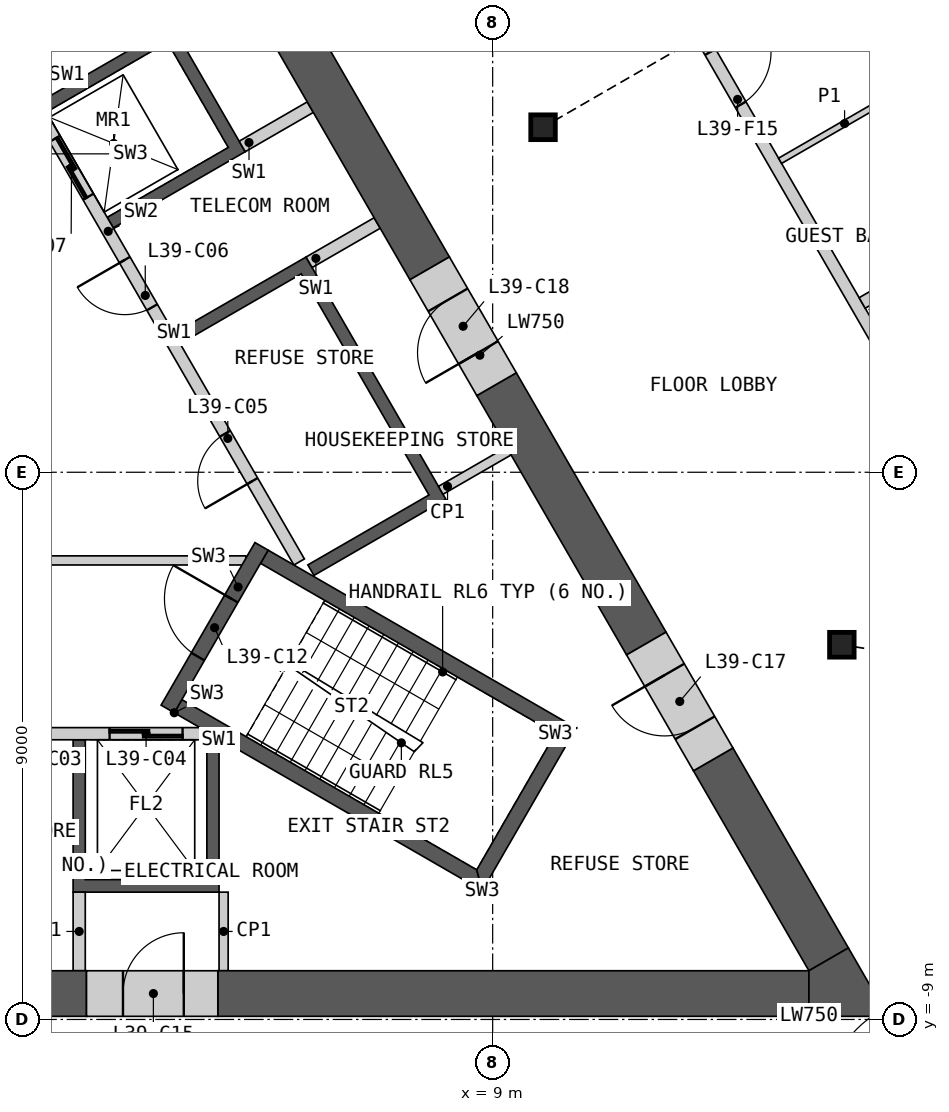
"""IFC4 building model, lengths in metres.
Left out: names, types, materials, properties, quantities, classifications, styles, units other than length and angle.
Written with IfcOpenShell. Run it as: python <this file> out.ifc"""

import sys

from ifc_helpers import new_model, si_unit, direction, frame, frame_2d, origin, origin_2d, place, context, subcontext, project, spatial, polyline, rectangle, i_section, outline, extrude, element, fill, save


model = new_model("IFC4")
c1 = context("Model", 3, precision=1e-05, world=origin(), true_north=direction((0.0, 1.0)))
c2 = subcontext(c1, "Body", "Model", "MODEL_VIEW")
j1 = project(units=[si_unit("LENGTHUNIT", "METRE"), si_unit("PLANEANGLEUNIT", "RADIAN")], contexts=[c1])
p1 = place(None, origin())
s1 = spatial("IfcSite", under=j1, at=p1, CompositionType="ELEMENT")
p2 = place(p1, origin())
s2 = spatial("IfcBuilding", under=s1, at=p2, CompositionType="ELEMENT")
p3 = place(p2, frame((0.0, 0.0, 183.6)))
s3 = spatial("IfcBuildingStorey", under=s2, at=p3, CompositionType="ELEMENT", Elevation=183.6)
for number, where, z_axis, x_axis in (
    (1, (14.743, -2.837, 0.0), (0.0, 0.0, 1.0), (1.0, 0.0, 0.0)),
    (2, (9.828, 5.675, 0.0), (0.0, 0.0, 1.0), (1.0, 0.0, 0.0)),
):
    element("IfcColumn", number, at=place(p3, frame(where, z_axis=z_axis, x_axis=x_axis)), inside=s3, PredefinedType="COLUMN", context=c2, shape_type="SweptSolid", body=[
        extrude(i_section(OverallWidth=0.404, OverallDepth=0.407, WebThickness=0.027, FlangeThickness=0.044, at=origin_2d()), origin(), (0.0, 0.0, 1.0), 3.6),
    ])
p4 = place(p3, origin())
e3 = element("IfcWall", 3, at=p4, inside=s3, PredefinedType="SHEAR", context=c2, shape_type="SweptSolid", body=[
    extrude(outline(polyline([(4.5, -4.4), (4.5, -6.906), (2.1, -6.906), (2.1, -4.4), (2.3, -4.4), (2.3, -6.7), (4.3, -6.7), (4.3, -4.4), (4.5, -4.4)])), origin(), (0.0, 0.0, 1.0), 3.25),
])
p5 = place(p3, frame((-4.187, -4.3, 0.0), z_axis=(0.0, 0.0, 1.0), x_axis=(1.0, 0.0, 0.0)))
e4 = element("IfcWall", 4, at=p5, inside=s3, PredefinedType="SOLIDWALL", context=c2, shape_type="SweptSolid", body=[
    extrude(rectangle(XDim=8.373, YDim=0.2, at=frame_2d((4.187, 0.0))), origin(), (0.0, 0.0, 1.0), 3.25),
])
p6 = place(p5, frame((0.287, 0.0, 0.0)))
e5 = element("IfcOpeningElement", 5, at=p6, cuts=e4, PredefinedType="OPENING", context=c2, shape_type="SweptSolid", body=[
    extrude(rectangle(XDim=1.2, YDim=2.1, at=frame_2d((0.6, 1.05))), frame((0.0, 0.11, 0.0), z_axis=(0.0, -1.0, 0.0), x_axis=(1.0, 0.0, 0.0)), (0.0, 0.0, 1.0), 0.22),
])
p7 = place(p5, frame((2.387, 0.0, 0.0)))
e6 = element("IfcOpeningElement", 6, at=p7, cuts=e4, PredefinedType="OPENING", context=c2, shape_type="SweptSolid", body=[
    extrude(rectangle(XDim=1.4, YDim=2.1, at=frame_2d((0.7, 1.05))), frame((0.0, 0.11, 0.0), z_axis=(0.0, -1.0, 0.0), x_axis=(1.0, 0.0, 0.0)), (0.0, 0.0, 1.0), 0.22),
])
p8 = place(p5, frame((4.837, 0.0, 0.0)))
e7 = element("IfcOpeningElement", 7, at=p8, cuts=e4, PredefinedType="OPENING", context=c2, shape_type="SweptSolid", body=[
    extrude(rectangle(XDim=0.9, YDim=2.1, at=frame_2d((0.45, 1.05))), frame((0.0, 0.11, 0.0), z_axis=(0.0, -1.0, 0.0), x_axis=(1.0, 0.0, 0.0)), (0.0, 0.0, 1.0), 0.22),
])
p9 = place(p5, frame((6.887, 0.0, 0.0)))
e8 = element("IfcOpeningElement", 8, at=p9, cuts=e4, PredefinedType="OPENING", context=c2, shape_type="SweptSolid", body=[
    extrude(rectangle(XDim=1.2, YDim=2.1, at=frame_2d((0.6, 1.05))), frame((0.0, 0.11, 0.0), z_axis=(0.0, -1.0, 0.0), x_axis=(1.0, 0.0, 0.0)), (0.0, 0.0, 1.0), 0.22),
])
p10 = place(p3, frame((2.2, -6.906, 0.0), z_axis=(0.0, 0.0, 1.0), x_axis=(0.0, -1.0, 0.0)))
e9 = element("IfcWall", 9, at=p10, inside=s3, PredefinedType="SHEAR", context=c2, shape_type="SweptSolid", body=[
    extrude(rectangle(XDim=1.293, YDim=0.2, at=frame_2d((0.646, 0.0))), origin(), (0.0, 0.0, 1.0), 3.25),
])
p11 = place(p3, origin())
e10 = element("IfcWall", 10, at=p11, inside=s3, PredefinedType="SHEAR", context=c2, shape_type="SweptSolid", body=[
    extrude(outline(polyline([(1.561, 6.097), (3.731, 7.35), (4.931, 5.272), (2.76, 4.019), (2.66, 4.192), (4.652, 5.342), (3.652, 7.074), (1.66, 5.924), (1.561, 6.097)])), origin(), (0.0, 0.0, 1.0), 3.25),
])
p12 = place(p3, origin())
e11 = element("IfcWall", 11, at=p12, inside=s3, PredefinedType="SHEAR", context=c2, shape_type="SweptSolid", body=[
    extrude(outline(polyline([(3.76, 2.287), (5.931, 3.54), (8.231, -0.444), (6.061, -1.697), (5.96, -1.524), (7.952, -0.374), (5.852, 3.263), (3.861, 2.113), (3.76, 2.287)])), origin(), (0.0, 0.0, 1.0), 3.25),
])
p13 = place(p3, frame((5.817, -1.476, 0.0), z_axis=(0.0, 0.0, 1.0), x_axis=(-0.500002616675, 0.866023893041, 0.0)))
e12 = element("IfcWall", 12, at=p13, inside=s3, PredefinedType="SOLIDWALL", context=c2, shape_type="SweptSolid", body=[
    extrude(rectangle(XDim=8.373, YDim=0.2, at=frame_2d((4.187, 0.0))), origin(), (0.0, 0.0, 1.0), 3.25),
])
p14 = place(p13, frame((1.537, 0.0, 0.0)))
e13 = element("IfcOpeningElement", 13, at=p14, cuts=e12, PredefinedType="OPENING", context=c2, shape_type="SweptSolid", body=[
    extrude(rectangle(XDim=0.9, YDim=2.1, at=frame_2d((0.45, 1.05))), frame((0.0, 0.11, 0.0), z_axis=(0.0, -1.0, 0.0), x_axis=(1.0, 0.0, 0.0)), (0.0, 0.0, 1.0), 0.22),
])
p15 = place(p13, frame((4.837, 0.0, 0.0)))
e14 = element("IfcOpeningElement", 14, at=p15, cuts=e12, PredefinedType="OPENING", context=c2, shape_type="SweptSolid", body=[
    extrude(rectangle(XDim=0.9, YDim=2.1, at=frame_2d((0.45, 1.05))), frame((0.0, 0.11, 0.0), z_axis=(0.0, -1.0, 0.0), x_axis=(1.0, 0.0, 0.0)), (0.0, 0.0, 1.0), 0.22),
])
p16 = place(p13, frame((6.937, 0.0, 0.0)))
e15 = element("IfcOpeningElement", 15, at=p16, cuts=e12, PredefinedType="OPENING", context=c2, shape_type="SweptSolid", body=[
    extrude(rectangle(XDim=1.1, YDim=2.1, at=frame_2d((0.55, 1.05))), frame((0.0, 0.11, 0.0), z_axis=(0.0, -1.0, 0.0), x_axis=(1.0, 0.0, 0.0)), (0.0, 0.0, 1.0), 0.22),
])
p17 = place(p3, frame((5.981, 3.453, 0.0), z_axis=(0.0, 0.0, 1.0), x_axis=(0.865968639725, 0.500098305348, 0.0)))
e16 = element("IfcWall", 16, at=p17, inside=s3, PredefinedType="SHEAR", context=c2, shape_type="SweptSolid", body=[
    extrude(rectangle(XDim=1.293, YDim=0.2, at=frame_2d((0.646, 0.0))), origin(), (0.0, 0.0, 1.0), 3.25),
])
p18 = place(p3, frame((4.881, 5.358, 0.0), z_axis=(0.0, 0.0, 1.0), x_axis=(0.866084958089, 0.499896834728, 0.0)))
e17 = element("IfcWall", 17, at=p18, inside=s3, PredefinedType="SHEAR", context=c2, shape_type="SweptSolid", body=[
    extrude(rectangle(XDim=1.293, YDim=0.2, at=frame_2d((0.646, 0.0))), origin(), (0.0, 0.0, 1.0), 3.25),
])
p19 = place(p3, frame((-4.941, -1.45, 0.0), z_axis=(0.0, 0.0, 1.0), x_axis=(1.0, 0.0, 0.0)))
e18 = element("IfcWall", 18, at=p19, inside=s3, PredefinedType="PARTITIONING", context=c2, shape_type="SweptSolid", body=[
    extrude(rectangle(XDim=9.882, YDim=0.15, at=frame_2d((4.941, 0.0))), origin(), (0.0, 0.0, 1.0), 3.25),
])
p20 = place(p19, frame((4.391, 0.0, 0.0)))
e19 = element("IfcOpeningElement", 19, at=p20, cuts=e18, PredefinedType="OPENING", context=c2, shape_type="SweptSolid", body=[
    extrude(rectangle(XDim=1.1, YDim=2.1, at=frame_2d((0.55, 1.05))), frame((0.0, 0.085, 0.0), z_axis=(0.0, -1.0, 0.0), x_axis=(1.0, 0.0, 0.0)), (0.0, 0.0, 1.0), 0.17),
])
p21 = place(p3, origin())
e20 = element("IfcWall", 20, at=p21, inside=s3, PredefinedType="SHEAR", context=c2, shape_type="SweptSolid", body=[
    extrude(outline(polyline([(3.763, -3.956), (8.83, -6.881), (8.738, -6.539), (3.888, -3.739), (3.763, -3.956)])), origin(), (0.0, 0.0, 1.0), 3.25),
])
p22 = place(p3, origin())
e21 = element("IfcWall", 21, at=p22, inside=s3, PredefinedType="SHEAR", context=c2, shape_type="SweptSolid", body=[
    extrude(outline(polyline([(8.83, -6.881), (10.374, -4.206), (10.032, -4.298), (8.738, -6.539), (8.83, -6.881)])), origin(), (0.0, 0.0, 1.0), 3.25),
])
p23 = place(p3, origin())
e22 = element("IfcWall", 22, at=p23, inside=s3, PredefinedType="SHEAR", context=c2, shape_type="SweptSolid", body=[
    extrude(outline(polyline([(10.032, -4.298), (10.374, -4.206), (5.307, -1.281), (5.182, -1.498), (10.032, -4.298)])), origin(), (0.0, 0.0, 1.0), 3.25),
])
p24 = place(p3, frame((3.655, -3.893, 0.0), z_axis=(0.0, 0.0, 1.0), x_axis=(0.499982516597, 0.866035497597, 0.0)))
e23 = element("IfcWall", 23, at=p24, inside=s3, PredefinedType="SHEAR", context=c2, shape_type="SweptSolid", body=[
    extrude(rectangle(XDim=3.088, YDim=0.25, at=frame_2d((1.544, 0.0))), origin(), (0.0, 0.0, 1.0), 3.25),
])
p25 = place(p24, frame((0.994, 0.0, 0.0)))
e24 = element("IfcOpeningElement", 24, at=p25, cuts=e23, PredefinedType="OPENING", context=c2, shape_type="SweptSolid", body=[
    extrude(rectangle(XDim=1.1, YDim=2.1, at=frame_2d((0.55, 1.05))), frame((0.0, 0.135, 0.0), z_axis=(0.0, -1.0, 0.0), x_axis=(1.0, 0.0, 0.0)), (0.0, 0.0, 1.0), 0.27),
])
for number, where, z_axis, x_axis in (
    (25, (4.575, -6.906, 0.0), (0.0, 0.0, 1.0), (0.0, -1.0, 0.0)),
    (26, (9.266, 0.349, 0.0), (0.0, 0.0, 1.0), (-0.866, -0.5, 0.0)),
):
    element("IfcWall", number, at=place(p3, frame(where, z_axis=z_axis, x_axis=x_axis)), inside=s3, PredefinedType="PARTITIONING", context=c2, shape_type="SweptSolid", body=[
        extrude(rectangle(XDim=1.293, YDim=0.15, at=frame_2d((0.646, 0.0))), origin(), (0.0, 0.0, 1.0), 3.25),
    ])
p26 = place(p3, frame((4.48, -8.574, 0.0), z_axis=(0.0, 0.0, 1.0), x_axis=(1.0, 0.0, 0.0)))
e27 = element("IfcWall", 27, at=p26, inside=s3, PredefinedType="SHEAR", context=c2, shape_type="SweptSolid", body=[
    extrude(rectangle(XDim=9.721, YDim=0.75, at=frame_2d((4.86, 0.0))), origin(), (0.0, 0.0, 1.0), 3.25),
])
p27 = place(p3, frame((-1.2, -8.574, 0.0), z_axis=(0.0, 0.0, 1.0), x_axis=(1.0, 0.0, 0.0)))
e28 = element("IfcWall", 28, at=p27, inside=s3, PredefinedType="SHEAR", context=c2, shape_type="SweptSolid", body=[
    extrude(rectangle(XDim=3.52, YDim=0.75, at=frame_2d((1.76, 0.0))), origin(), (0.0, 0.0, 1.0), 3.25),
])
p28 = place(p3, frame((7.964, 3.354, 0.0), z_axis=(0.0, 0.0, 1.0), x_axis=(-0.50002928721, 0.866008494146, 0.0)))
e29 = element("IfcWall", 29, at=p28, inside=s3, PredefinedType="SHEAR", context=c2, shape_type="SweptSolid", body=[
    extrude(rectangle(XDim=6.405, YDim=0.75, at=frame_2d((3.203, 0.0))), origin(), (0.0, 0.0, 1.0), 3.25),
])
p29 = place(p3, frame((11.527, -2.817, 0.0), z_axis=(0.0, 0.0, 1.0), x_axis=(-0.50001992892, 0.866013897511, 0.0)))
e30 = element("IfcWall", 30, at=p29, inside=s3, PredefinedType="SHEAR", context=c2, shape_type="SweptSolid", body=[
    extrude(rectangle(XDim=4.926, YDim=0.75, at=frame_2d((2.463, 0.0))), origin(), (0.0, 0.0, 1.0), 3.25),
])
p30 = place(p3, frame((14.526, -8.011, 0.0), z_axis=(0.0, 0.0, 1.0), x_axis=(-0.499996970966, 0.866027152591, 0.0)))
e31 = element("IfcWall", 31, at=p30, inside=s3, PredefinedType="SHEAR", context=c2, shape_type="SweptSolid", body=[
    extrude(rectangle(XDim=3.798, YDim=0.75, at=frame_2d((1.899, 0.0))), origin(), (0.0, 0.0, 1.0), 3.25),
])
p31 = place(p3, origin())
e32 = element("IfcWall", 32, at=p31, inside=s3, PredefinedType="SHEAR", context=c2, shape_type="SweptSolid", body=[
    extrude(outline(polyline([(14.201, -8.949), (14.201, -8.199), (14.851, -7.824), (15.5, -8.949), (14.201, -8.949)])), origin(), (0.0, 0.0, 1.0), 3.25),
])
p32 = place(p3, frame((2.32, -8.574, 0.0), z_axis=(0.0, 0.0, 1.0), x_axis=(1.0, 0.0, 0.0)))
e33 = element("IfcWall", 33, at=p32, inside=s3, PredefinedType="SHEAR", context=c2, shape_type="SweptSolid", body=[
    extrude(rectangle(XDim=2.16, YDim=0.75, at=frame_2d((1.08, 0.0))), origin(), (0.0, 0.0, 1.0), 3.25),
])
p33 = place(p32, frame((0.6, 0.0, 0.0)))
e34 = element("IfcOpeningElement", 34, at=p33, cuts=e33, PredefinedType="OPENING", context=c2, shape_type="SweptSolid", body=[
    extrude(rectangle(XDim=1.0, YDim=2.1, at=frame_2d((0.5, 1.05))), frame((0.0, 0.385, 0.0), z_axis=(0.0, -1.0, 0.0), x_axis=(1.0, 0.0, 0.0)), (0.0, 0.0, 1.0), 0.77),
])
p34 = place(p3, frame((12.627, -4.722, 0.0), z_axis=(0.0, 0.0, 1.0), x_axis=(-0.499946605688, 0.86605622881, 0.0)))
e35 = element("IfcWall", 35, at=p34, inside=s3, PredefinedType="SHEAR", context=c2, shape_type="SweptSolid", body=[
    extrude(rectangle(XDim=2.2, YDim=0.75, at=frame_2d((1.1, 0.0))), origin(), (0.0, 0.0, 1.0), 3.25),
])
p35 = place(p34, frame((0.6, 0.0, 0.0)))
e36 = element("IfcOpeningElement", 36, at=p35, cuts=e35, PredefinedType="OPENING", context=c2, shape_type="SweptSolid", body=[
    extrude(rectangle(XDim=1.0, YDim=2.1, at=frame_2d((0.5, 1.05))), frame((0.0, 0.385, 0.0), z_axis=(0.0, -1.0, 0.0), x_axis=(1.0, 0.0, 0.0)), (0.0, 0.0, 1.0), 0.77),
])
p36 = place(p3, frame((9.064, 1.448, 0.0), z_axis=(0.0, 0.0, 1.0), x_axis=(-0.50002983664, 0.866008176907, 0.0)))
e37 = element("IfcWall", 37, at=p36, inside=s3, PredefinedType="SHEAR", context=c2, shape_type="SweptSolid", body=[
    extrude(rectangle(XDim=2.2, YDim=0.75, at=frame_2d((1.1, 0.0))), origin(), (0.0, 0.0, 1.0), 3.25),
])
p37 = place(p36, frame((0.6, 0.0, 0.0)))
e38 = element("IfcOpeningElement", 38, at=p37, cuts=e37, PredefinedType="OPENING", context=c2, shape_type="SweptSolid", body=[
    extrude(rectangle(XDim=1.0, YDim=2.1, at=frame_2d((0.5, 1.05))), frame((0.0, 0.385, 0.0), z_axis=(0.0, -1.0, 0.0), x_axis=(1.0, 0.0, 0.0)), (0.0, 0.0, 1.0), 0.77),
])
p38 = place(p3, frame((5.377, 19.385, 0.0), z_axis=(0.0, 0.0, 1.0), x_axis=(0.500000757641, -0.86602496636, 0.0)))
e39 = element("IfcWall", 39, at=p38, inside=s3, PredefinedType="PARTITIONING", context=c2, shape_type="SweptSolid", body=[
    extrude(rectangle(XDim=28.198, YDim=0.2, at=frame_2d((14.099, 0.0))), origin(), (0.0, 0.0, 1.0), 3.25),
])
p39 = place(p38, frame((22.735, 0.0, 0.0)))
e40 = element("IfcOpeningElement", 40, at=p39, cuts=e39, PredefinedType="OPENING", context=c2, shape_type="SweptSolid", body=[
    extrude(rectangle(XDim=1.8, YDim=2.1, at=frame_2d((0.9, 1.05))), frame((0.0, 0.11, 0.0), z_axis=(0.0, -1.0, 0.0), x_axis=(1.0, 0.0, 0.0)), (0.0, 0.0, 1.0), 0.22),
])
p40 = place(p38, frame((14.402, 0.0, 0.0)))
e41 = element("IfcOpeningElement", 41, at=p40, cuts=e39, PredefinedType="OPENING", context=c2, shape_type="SweptSolid", body=[
    extrude(rectangle(XDim=1.0, YDim=2.1, at=frame_2d((0.5, 1.05))), frame((0.0, 0.11, 0.0), z_axis=(0.0, -1.0, 0.0), x_axis=(1.0, 0.0, 0.0)), (0.0, 0.0, 1.0), 0.22),
])
p41 = place(p38, frame((12.796, 0.0, 0.0)))
e42 = element("IfcOpeningElement", 42, at=p41, cuts=e39, PredefinedType="OPENING", context=c2, shape_type="SweptSolid", body=[
    extrude(rectangle(XDim=1.0, YDim=2.1, at=frame_2d((0.5, 1.05))), frame((0.0, 0.11, 0.0), z_axis=(0.0, -1.0, 0.0), x_axis=(1.0, 0.0, 0.0)), (0.0, 0.0, 1.0), 0.22),
])
p42 = place(p38, frame((4.164, 0.0, 0.0)))
e43 = element("IfcOpeningElement", 43, at=p42, cuts=e39, PredefinedType="OPENING", context=c2, shape_type="SweptSolid", body=[
    extrude(rectangle(XDim=1.0, YDim=2.1, at=frame_2d((0.5, 1.05))), frame((0.0, 0.11, 0.0), z_axis=(0.0, -1.0, 0.0), x_axis=(1.0, 0.0, 0.0)), (0.0, 0.0, 1.0), 0.22),
])
p43 = place(p38, frame((1.452, 0.0, 0.0)))
e44 = element("IfcOpeningElement", 44, at=p43, cuts=e39, PredefinedType="OPENING", context=c2, shape_type="SweptSolid", body=[
    extrude(rectangle(XDim=0.95, YDim=2.1, at=frame_2d((0.475, 1.05))), frame((0.0, 0.11, 0.0), z_axis=(0.0, -1.0, 0.0), x_axis=(1.0, 0.0, 0.0)), (0.0, 0.0, 1.0), 0.22),
])
p44 = place(p3, frame((15.077, 2.784, 0.0), z_axis=(0.0, 0.0, 1.0), x_axis=(0.866020469142, 0.500008546953, 0.0)))
e45 = element("IfcWall", 45, at=p44, inside=s3, PredefinedType="PARTITIONING", context=c2, shape_type="SweptSolid", body=[
    extrude(rectangle(XDim=5.171, YDim=0.2, at=frame_2d((2.585, 0.0))), origin(), (0.0, 0.0, 1.0), 2.404),
])
p45 = place(p3, frame((13.727, 5.123, 0.0), z_axis=(0.0, 0.0, 1.0), x_axis=(0.866032905446, 0.499987006516, 0.0)))
e46 = element("IfcWall", 46, at=p45, inside=s3, PredefinedType="PARTITIONING", context=c2, shape_type="SweptSolid", body=[
    extrude(rectangle(XDim=2.45, YDim=0.1, at=frame_2d((1.225, 0.0))), origin(), (0.0, 0.0, 1.0), 2.404),
])
p46 = place(p9, origin())
e47 = element("IfcDoor", 47, at=p46, inside=s3, OperationType="SLIDING_TO_LEFT", PredefinedType="DOOR", context=c2, shape_type="SweptSolid", body=[
    extrude(rectangle(XDim=1.2, YDim=2.1, at=frame_2d((0.6, 1.05))), frame((0.0, 0.025, 0.0), z_axis=(0.0, -1.0, 0.0), x_axis=(1.0, 0.0, 0.0)), (0.0, 0.0, 1.0), 0.05),
])
fill(e8, e47)
p47 = place(p14, origin())
e48 = element("IfcDoor", 48, at=p47, inside=s3, OperationType="SINGLE_SWING_LEFT", PredefinedType="DOOR", context=c2, shape_type="SweptSolid", body=[
    extrude(rectangle(XDim=0.9, YDim=2.1, at=frame_2d((0.45, 1.05))), frame((0.0, 0.025, 0.0), z_axis=(0.0, -1.0, 0.0), x_axis=(1.0, 0.0, 0.0)), (0.0, 0.0, 1.0), 0.05),
])
fill(e13, e48)
p48 = place(p15, origin())
e49 = element("IfcDoor", 49, at=p48, inside=s3, OperationType="SINGLE_SWING_RIGHT", PredefinedType="DOOR", context=c2, shape_type="SweptSolid", body=[
    extrude(rectangle(XDim=0.9, YDim=2.1, at=frame_2d((0.45, 1.05))), frame((0.0, 0.025, 0.0), z_axis=(0.0, -1.0, 0.0), x_axis=(1.0, 0.0, 0.0)), (0.0, 0.0, 1.0), 0.05),
])
fill(e14, e49)
p49 = place(p16, origin())
e50 = element("IfcDoor", 50, at=p49, inside=s3, OperationType="SLIDING_TO_LEFT", PredefinedType="DOOR", context=c2, shape_type="SweptSolid", body=[
    extrude(rectangle(XDim=1.1, YDim=2.1, at=frame_2d((0.55, 1.05))), frame((0.0, 0.025, 0.0), z_axis=(0.0, -1.0, 0.0), x_axis=(1.0, 0.0, 0.0)), (0.0, 0.0, 1.0), 0.05),
])
fill(e15, e50)
p50 = place(p25, origin())
e51 = element("IfcDoor", 51, at=p50, inside=s3, OperationType="SINGLE_SWING_RIGHT", PredefinedType="DOOR", context=c2, shape_type="SweptSolid", body=[
    extrude(rectangle(XDim=1.1, YDim=2.1, at=frame_2d((0.55, 1.05))), frame((0.0, 0.025, 0.0), z_axis=(0.0, -1.0, 0.0), x_axis=(1.0, 0.0, 0.0)), (0.0, 0.0, 1.0), 0.05),
])
fill(e24, e51)
p51 = place(p33, origin())
e52 = element("IfcDoor", 52, at=p51, inside=s3, OperationType="SINGLE_SWING_RIGHT", PredefinedType="DOOR", context=c2, shape_type="SweptSolid", body=[
    extrude(rectangle(XDim=1.0, YDim=2.1, at=frame_2d((0.5, 1.05))), frame((0.0, 0.13, 0.0), z_axis=(0.0, -1.0, 0.0), x_axis=(1.0, 0.0, 0.0)), (0.0, 0.0, 1.0), 0.05),
])
fill(e34, e52)
p52 = place(p35, origin())
e53 = element("IfcDoor", 53, at=p52, inside=s3, OperationType="SINGLE_SWING_RIGHT", PredefinedType="DOOR", context=c2, shape_type="SweptSolid", body=[
    extrude(rectangle(XDim=1.0, YDim=2.1, at=frame_2d((0.5, 1.05))), frame((0.0, 0.13, 0.0), z_axis=(0.0, -1.0, 0.0), x_axis=(1.0, 0.0, 0.0)), (0.0, 0.0, 1.0), 0.05),
])
fill(e36, e53)
p53 = place(p37, origin())
e54 = element("IfcDoor", 54, at=p53, inside=s3, OperationType="SINGLE_SWING_LEFT", PredefinedType="DOOR", context=c2, shape_type="SweptSolid", body=[
    extrude(rectangle(XDim=1.0, YDim=2.1, at=frame_2d((0.5, 1.05))), frame((0.0, 0.13, 0.0), z_axis=(0.0, -1.0, 0.0), x_axis=(1.0, 0.0, 0.0)), (0.0, 0.0, 1.0), 0.05),
])
fill(e38, e54)
p54 = place(p40, origin())
e55 = element("IfcDoor", 55, at=p54, inside=s3, OperationType="SINGLE_SWING_LEFT", PredefinedType="DOOR", context=c2, shape_type="SweptSolid", body=[
    extrude(rectangle(XDim=1.0, YDim=2.1, at=frame_2d((0.5, 1.05))), frame((0.0, 0.025, 0.0), z_axis=(0.0, -1.0, 0.0), x_axis=(1.0, 0.0, 0.0)), (0.0, 0.0, 1.0), 0.05),
])
fill(e41, e55)
save(model, sys.argv[1])
